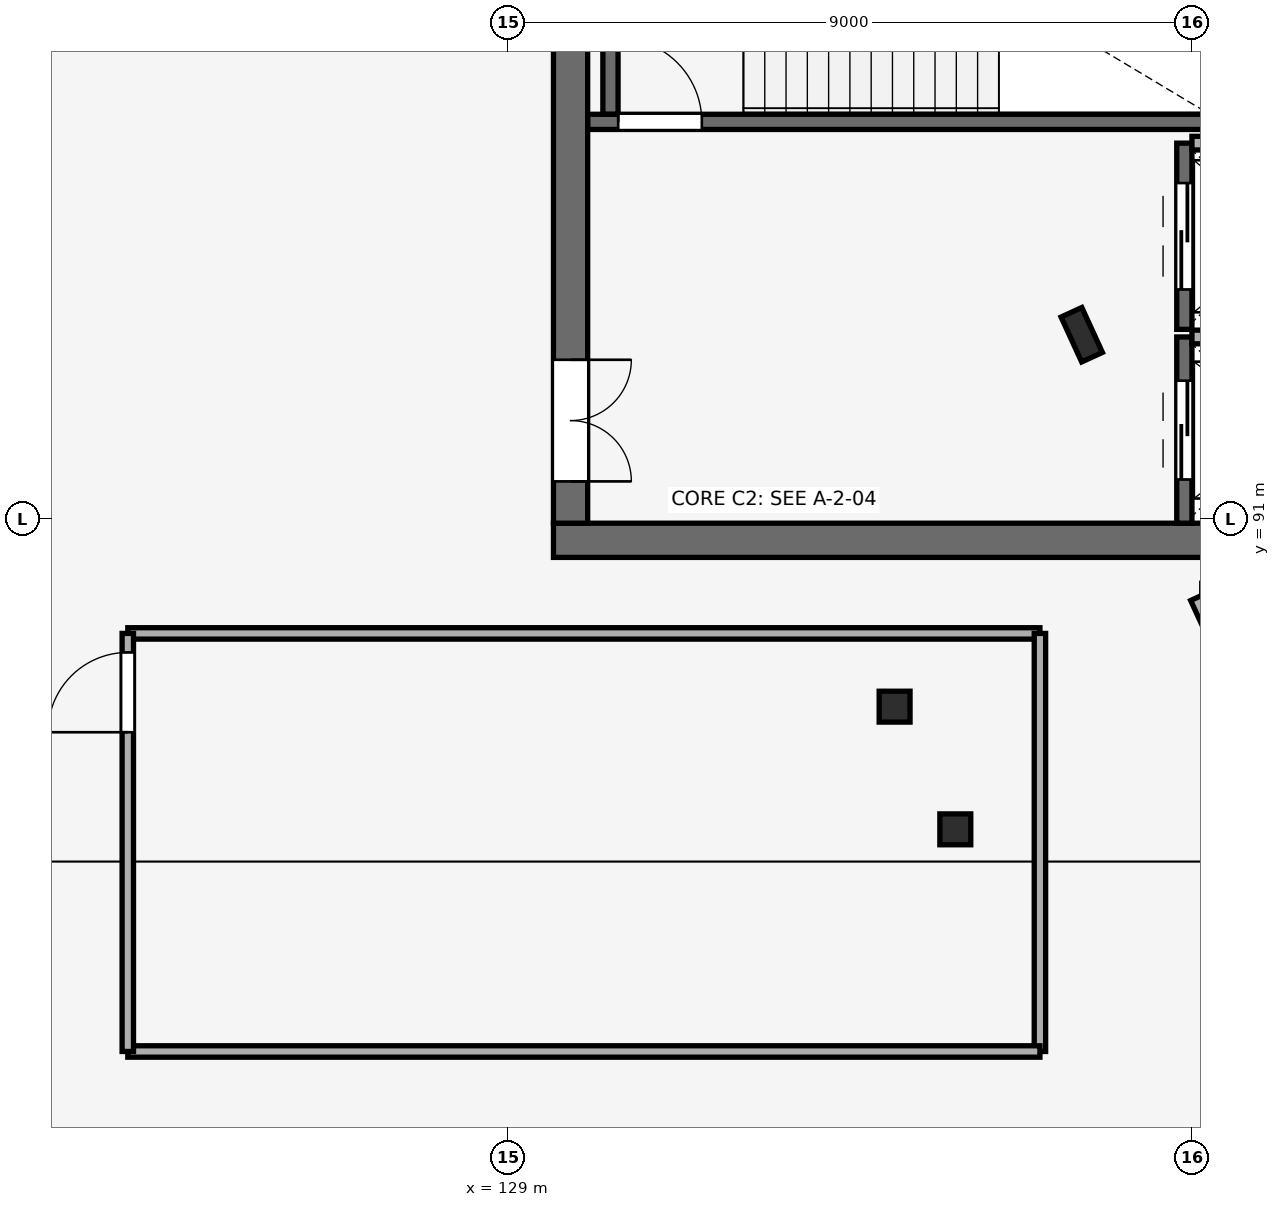
"""IFC4 building model, lengths in metres.
Left out: names, types, materials, properties, quantities, classifications, styles, units other than length and angle.
Written with IfcOpenShell. Run it as: python <this file> out.ifc"""

import sys

from ifc_helpers import new_model, si_unit, direction, frame, frame_2d, origin, origin_2d, place, context, subcontext, project, spatial, rectangle, hollow_circle, i_section, extrude, element, fill, save


model = new_model("IFC4")
c1 = context("Model", 3, precision=1e-05, world=origin(), true_north=direction((0.0, 1.0)))
c2 = subcontext(c1, "Body", "Model", "MODEL_VIEW")
j1 = project(units=[si_unit("LENGTHUNIT", "METRE"), si_unit("PLANEANGLEUNIT", "RADIAN")], contexts=[c1])
p1 = place(None, origin())
s1 = spatial("IfcSite", under=j1, at=p1, CompositionType="ELEMENT")
p2 = place(p1, origin())
s2 = spatial("IfcBuilding", under=s1, at=p2, CompositionType="ELEMENT")
p3 = place(p2, frame((0.0, 0.0, 19.5)))
s3 = spatial("IfcBuildingStorey", under=s2, at=p3, CompositionType="ELEMENT", Elevation=19.5)
p4 = place(p3, frame((136.55, 93.43, 0.0), z_axis=(0.0, 0.0, 1.0), x_axis=(0.909018020308, 0.416756810089, 0.0)))
e1 = element("IfcColumn", 1, at=p4, inside=s3, PredefinedType="COLUMN", context=c2, shape_type="SweptSolid", body=[
    extrude(i_section(OverallWidth=0.3, OverallDepth=0.65, WebThickness=0.016, FlangeThickness=0.031, FilletRadius=0.027, at=origin_2d()), origin(), (0.0, 0.0, 1.0), 4.5),
])
p5 = place(p3, frame((129.6, 90.725, 0.0), z_axis=(0.0, 0.0, 1.0), x_axis=(1.0, 0.0, 0.0)))
e2 = element("IfcWall", 2, at=p5, inside=s3, PredefinedType="SHEAR", context=c2, shape_type="SweptSolid", body=[
    extrude(rectangle(XDim=11.4, YDim=0.45, at=frame_2d((5.7, 0.0))), origin(), (0.0, 0.0, 1.0), 4.5),
])
p6 = place(p3, frame((129.825, 90.95, 0.0), z_axis=(0.0, 0.0, 1.0), x_axis=(0.0, 1.0, 0.0)))
e3 = element("IfcWall", 3, at=p6, inside=s3, PredefinedType="SHEAR", context=c2, shape_type="SweptSolid", body=[
    extrude(rectangle(XDim=9.1, YDim=0.45, at=frame_2d((4.55, 0.0))), origin(), (0.0, 0.0, 1.0), 4.5),
])
p7 = place(p6, frame((0.55, 0.0, 0.0)))
e4 = element("IfcOpeningElement", 4, at=p7, cuts=e3, PredefinedType="OPENING", context=c2, shape_type="SweptSolid", body=[
    extrude(rectangle(XDim=1.6, YDim=2.2, at=frame_2d((0.8, 1.1))), frame((0.0, 0.235, 0.0), z_axis=(0.0, -1.0, 0.0), x_axis=(1.0, 0.0, 0.0)), (0.0, 0.0, 1.0), 0.47),
])
for number, where, z_axis, x_axis in (
    (5, (134.887, 86.923, 0.0), (0.0, 0.0, 1.0), (1.0, 0.0, 0.0)),
    (6, (134.088, 88.537, 0.0), (0.0, 0.0, 1.0), (1.0, 0.0, 0.0)),
):
    element("IfcColumn", number, at=place(p3, frame(where, z_axis=z_axis, x_axis=x_axis)), inside=s3, PredefinedType="COLUMN", context=c2, shape_type="SweptSolid", body=[
        extrude(hollow_circle(Radius=0.203, WallThickness=0.016, at=origin_2d()), origin(), (0.0, 0.0, 1.0), 4.5),
    ])
p8 = place(p3, frame((138.129, 90.0, 0.0), z_axis=(0.0, 0.0, 1.0), x_axis=(0.418114917524, -0.908394141188, 0.0)))
e7 = element("IfcWall", 7, at=p8, inside=s3, PredefinedType="STANDARD", context=c2, shape_type="SweptSolid", body=[
    extrude(rectangle(XDim=2.118, YDim=0.32, at=frame_2d((1.059, 0.0))), origin(), (0.0, 0.0, 1.0), 3.562),
])
p9 = place(p3, frame((137.9, 90.95, 0.0), z_axis=(0.0, 0.0, 1.0), x_axis=(0.0, 1.0, 0.0)))
e8 = element("IfcWall", 8, at=p9, inside=s3, PredefinedType="SHEAR", context=c2, shape_type="SweptSolid", body=[
    extrude(rectangle(XDim=2.45, YDim=0.2, at=frame_2d((1.225, 0.0))), origin(), (0.0, 0.0, 1.0), 4.25),
])
p10 = place(p9, frame((0.575, 0.0, 0.0)))
e9 = element("IfcOpeningElement", 9, at=p10, cuts=e8, PredefinedType="OPENING", context=c2, shape_type="SweptSolid", body=[
    extrude(rectangle(XDim=1.3, YDim=2.2, at=frame_2d((0.65, 1.1))), frame((0.0, 0.11, 0.0), z_axis=(0.0, -1.0, 0.0), x_axis=(1.0, 0.0, 0.0)), (0.0, 0.0, 1.0), 0.22),
])
p11 = place(p3, frame((138.0, 93.4, 0.0), z_axis=(0.0, 0.0, 1.0), x_axis=(1.0, 0.0, 0.0)))
e10 = element("IfcWall", 10, at=p11, inside=s3, PredefinedType="PARTITIONING", context=c2, shape_type="SweptSolid", body=[
    extrude(rectangle(XDim=2.45, YDim=0.18, at=frame_2d((1.225, 0.0))), origin(), (0.0, 0.0, 1.0), 4.5),
])
p12 = place(p3, frame((137.9, 93.5, 0.0), z_axis=(0.0, 0.0, 1.0), x_axis=(0.0, 1.0, 0.0)))
e11 = element("IfcWall", 11, at=p12, inside=s3, PredefinedType="SHEAR", context=c2, shape_type="SweptSolid", body=[
    extrude(rectangle(XDim=2.45, YDim=0.2, at=frame_2d((1.225, 0.0))), origin(), (0.0, 0.0, 1.0), 4.25),
])
p13 = place(p12, frame((0.525, 0.0, 0.0)))
e12 = element("IfcOpeningElement", 12, at=p13, cuts=e11, PredefinedType="OPENING", context=c2, shape_type="SweptSolid", body=[
    extrude(rectangle(XDim=1.4, YDim=2.2, at=frame_2d((0.7, 1.1))), frame((0.0, 0.11, 0.0), z_axis=(0.0, -1.0, 0.0), x_axis=(1.0, 0.0, 0.0)), (0.0, 0.0, 1.0), 0.22),
])
p14 = place(p3, frame((138.0, 95.95, 0.0), z_axis=(0.0, 0.0, 1.0), x_axis=(1.0, 0.0, 0.0)))
e13 = element("IfcWall", 13, at=p14, inside=s3, PredefinedType="PARTITIONING", context=c2, shape_type="SweptSolid", body=[
    extrude(rectangle(XDim=2.45, YDim=0.18, at=frame_2d((1.225, 0.0))), origin(), (0.0, 0.0, 1.0), 4.5),
])
p15 = place(p3, frame((130.052, 96.23, 0.0), z_axis=(0.0, 0.0, 1.0), x_axis=(1.0, 0.0, 0.0)))
e14 = element("IfcWall", 14, at=p15, inside=s3, PredefinedType="SHEAR", context=c2, shape_type="SweptSolid", body=[
    extrude(rectangle(XDim=8.248, YDim=0.2, at=frame_2d((4.124, 0.0))), origin(), (0.0, 0.0, 1.0), 4.5),
])
p16 = place(p15, frame((0.4, 0.0, 0.0)))
e15 = element("IfcOpeningElement", 15, at=p16, cuts=e14, PredefinedType="OPENING", context=c2, shape_type="SweptSolid", body=[
    extrude(rectangle(XDim=1.1, YDim=2.15, at=frame_2d((0.55, 1.075))), frame((0.0, 0.11, 0.0), z_axis=(0.0, -1.0, 0.0), x_axis=(1.0, 0.0, 0.0)), (0.0, 0.0, 1.0), 0.22),
])
p17 = place(p3, frame((130.35, 96.332, 0.0), z_axis=(0.0, 0.0, 1.0), x_axis=(0.0, 1.0, 0.0)))
e16 = element("IfcWall", 16, at=p17, inside=s3, PredefinedType="SHEAR", context=c2, shape_type="SweptSolid", body=[
    extrude(rectangle(XDim=3.686, YDim=0.2, at=frame_2d((1.843, 0.0))), origin(), (0.0, 0.0, 1.0), 4.5),
])
p18 = place(p3, frame((124.0, 89.5, 0.0), z_axis=(0.0, 0.0, 1.0), x_axis=(1.0, 0.0, 0.0)))
e17 = element("IfcWall", 17, at=p18, inside=s3, PredefinedType="PARTITIONING", context=c2, shape_type="SweptSolid", body=[
    extrude(rectangle(XDim=12.0, YDim=0.15, at=frame_2d((6.0, 0.0))), origin(), (0.0, 0.0, 1.0), 4.25),
])
p19 = place(p3, frame((136.0, 89.5, 0.0), z_axis=(0.0, 0.0, 1.0), x_axis=(0.0, -1.0, 0.0)))
e18 = element("IfcWall", 18, at=p19, inside=s3, PredefinedType="PARTITIONING", context=c2, shape_type="SweptSolid", body=[
    extrude(rectangle(XDim=5.5, YDim=0.15, at=frame_2d((2.75, 0.0))), origin(), (0.0, 0.0, 1.0), 4.25),
])
p20 = place(p3, frame((136.0, 84.0, 0.0), z_axis=(0.0, 0.0, 1.0), x_axis=(-1.0, 0.0, 0.0)))
e19 = element("IfcWall", 19, at=p20, inside=s3, PredefinedType="PARTITIONING", context=c2, shape_type="SweptSolid", body=[
    extrude(rectangle(XDim=12.0, YDim=0.15, at=frame_2d((6.0, 0.0))), origin(), (0.0, 0.0, 1.0), 4.25),
])
p21 = place(p3, frame((124.0, 84.0, 0.0), z_axis=(0.0, 0.0, 1.0), x_axis=(0.0, 1.0, 0.0)))
e20 = element("IfcWall", 20, at=p21, inside=s3, PredefinedType="PARTITIONING", context=c2, shape_type="SweptSolid", body=[
    extrude(rectangle(XDim=5.5, YDim=0.15, at=frame_2d((2.75, 0.0))), origin(), (0.0, 0.0, 1.0), 4.25),
])
p22 = place(p21, frame((4.2, 0.0, 0.0)))
e21 = element("IfcOpeningElement", 21, at=p22, cuts=e20, PredefinedType="OPENING", context=c2, shape_type="SweptSolid", body=[
    extrude(rectangle(XDim=1.05, YDim=2.15, at=frame_2d((0.525, 1.075))), frame((0.0, 0.085, 0.0), z_axis=(0.0, -1.0, 0.0), x_axis=(1.0, 0.0, 0.0)), (0.0, 0.0, 1.0), 0.17),
])
p23 = place(p10, origin())
e22 = element("IfcDoor", 22, at=p23, inside=s3, OperationType="DOUBLE_DOOR_SLIDING", PredefinedType="DOOR", context=c2, shape_type="SweptSolid", body=[
    extrude(rectangle(XDim=1.3, YDim=2.2, at=frame_2d((0.65, 1.1))), frame((0.0, 0.025, 0.0), z_axis=(0.0, -1.0, 0.0), x_axis=(1.0, 0.0, 0.0)), (0.0, 0.0, 1.0), 0.05),
])
fill(e9, e22)
p24 = place(p13, origin())
e23 = element("IfcDoor", 23, at=p24, inside=s3, OperationType="DOUBLE_DOOR_SLIDING", PredefinedType="DOOR", context=c2, shape_type="SweptSolid", body=[
    extrude(rectangle(XDim=1.4, YDim=2.2, at=frame_2d((0.7, 1.1))), frame((0.0, 0.025, 0.0), z_axis=(0.0, -1.0, 0.0), x_axis=(1.0, 0.0, 0.0)), (0.0, 0.0, 1.0), 0.05),
])
fill(e12, e23)
p25 = place(p16, frame((1.1, 0.0, 0.0), z_axis=(0.0, 0.0, 1.0), x_axis=(-1.0, 0.0, 0.0)))
e24 = element("IfcDoor", 24, at=p25, inside=s3, OperationType="SINGLE_SWING_RIGHT", PredefinedType="DOOR", context=c2, shape_type="SweptSolid", body=[
    extrude(rectangle(XDim=1.1, YDim=2.15, at=frame_2d((0.55, 1.075))), frame((0.0, 0.025, 0.0), z_axis=(0.0, -1.0, 0.0), x_axis=(1.0, 0.0, 0.0)), (0.0, 0.0, 1.0), 0.05),
])
fill(e15, e24)
p26 = place(p7, frame((1.6, 0.0, 0.0), z_axis=(0.0, 0.0, 1.0), x_axis=(-1.0, 0.0, 0.0)))
e25 = element("IfcDoor", 25, at=p26, inside=s3, OperationType="DOUBLE_DOOR_SINGLE_SWING", PredefinedType="DOOR", context=c2, shape_type="SweptSolid", body=[
    extrude(rectangle(XDim=1.6, YDim=2.2, at=frame_2d((0.8, 1.1))), frame((0.0, 0.025, 0.0), z_axis=(0.0, -1.0, 0.0), x_axis=(1.0, 0.0, 0.0)), (0.0, 0.0, 1.0), 0.05),
])
fill(e4, e25)
p27 = place(p22, origin())
e26 = element("IfcDoor", 26, at=p27, inside=s3, OperationType="SINGLE_SWING_LEFT", PredefinedType="DOOR", context=c2, shape_type="SweptSolid", body=[
    extrude(rectangle(XDim=1.05, YDim=2.15, at=frame_2d((0.525, 1.075))), frame((0.0, 0.025, 0.0), z_axis=(0.0, -1.0, 0.0), x_axis=(1.0, 0.0, 0.0)), (0.0, 0.0, 1.0), 0.05),
])
fill(e21, e26)
save(model, sys.argv[1])
